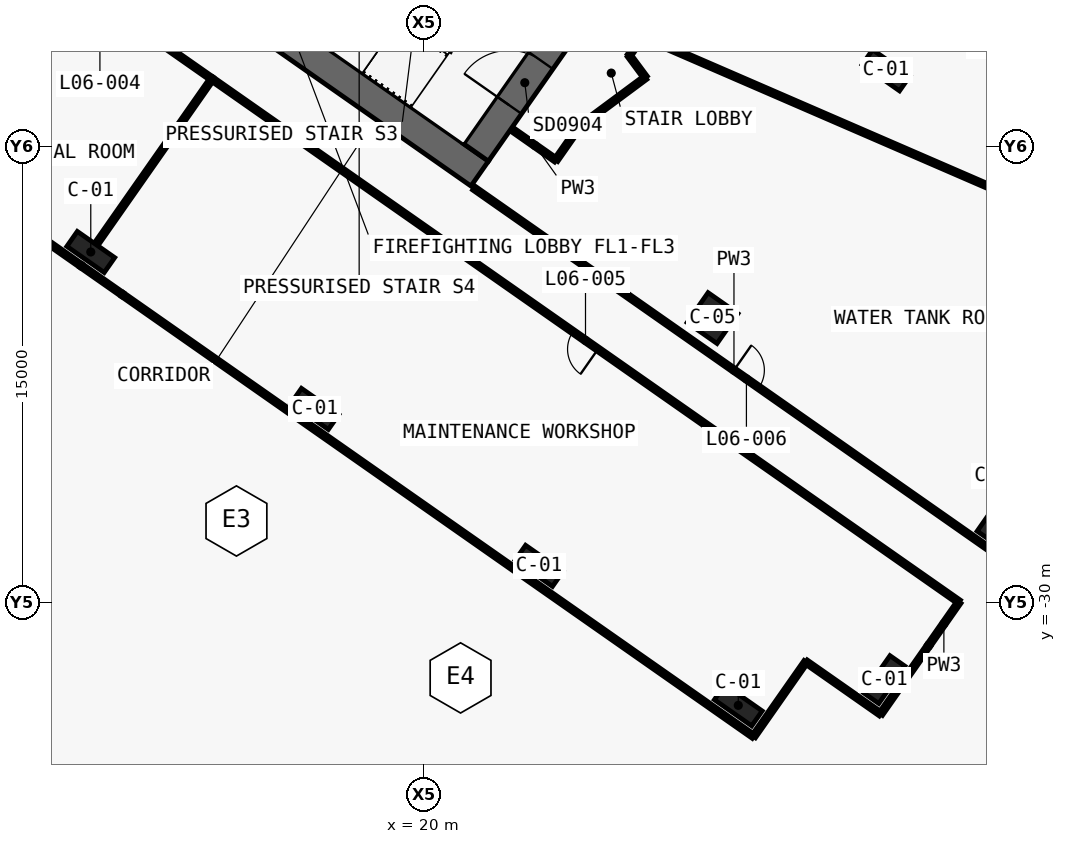
"""IFC4 building model, lengths in metres.
Left out: names, types, materials, properties, quantities, classifications, styles, units other than length and angle.
Written with IfcOpenShell. Run it as: python <this file> out.ifc"""

import sys

from ifc_helpers import new_model, si_unit, direction, frame, frame_2d, origin, origin_2d, place, context, subcontext, project, spatial, polyline, rectangle, outline, extrude, element, fill, save


model = new_model("IFC4")
c1 = context("Model", 3, precision=1e-05, world=origin(), true_north=direction((0.0, 1.0)))
c2 = subcontext(c1, "Body", "Model", "MODEL_VIEW")
j1 = project(units=[si_unit("LENGTHUNIT", "METRE"), si_unit("PLANEANGLEUNIT", "RADIAN")], contexts=[c1])
p1 = place(None, origin())
s1 = spatial("IfcSite", under=j1, at=p1, CompositionType="ELEMENT")
p2 = place(p1, origin())
s2 = spatial("IfcBuilding", under=s1, at=p2, CompositionType="ELEMENT")
p3 = place(p2, frame((0.0, 0.0, 43.0)))
s3 = spatial("IfcBuildingStorey", under=s2, at=p3, CompositionType="ELEMENT", Elevation=43.0)
p4 = place(p3, frame((-0.037, -0.585, 0.0), z_axis=(0.0, 0.0, 1.0), x_axis=(0.819157152511, -0.573569140985, 0.0)))
e1 = element("IfcWall", 1, at=p4, inside=s3, PredefinedType="SHEAR", context=c2, shape_type="SweptSolid", body=[
    extrude(outline(polyline([(26.695, 0.5), (0.0, 0.5), (0.7, -0.5), (26.695, -0.5), (26.695, 0.5)])), origin(), (0.0, 0.0, 1.0), 5.5),
])
p5 = place(p4, frame((1.245, 0.0, 0.0)))
e2 = element("IfcOpeningElement", 2, at=p5, cuts=e1, PredefinedType="OPENING", context=c2, shape_type="SweptSolid", body=[
    extrude(rectangle(XDim=1.5, YDim=2.1, at=frame_2d((0.75, 1.05))), frame((0.0, 0.51, 0.0), z_axis=(0.0, -1.0, 0.0), x_axis=(1.0, 0.0, 0.0)), (0.0, 0.0, 1.0), 1.02),
])
p6 = place(p4, frame((12.445, 0.0, 0.0)))
e3 = element("IfcOpeningElement", 3, at=p6, cuts=e1, PredefinedType="OPENING", context=c2, shape_type="SweptSolid", body=[
    extrude(rectangle(XDim=1.5, YDim=2.1, at=frame_2d((0.75, 1.05))), frame((0.0, 0.51, 0.0), z_axis=(0.0, -1.0, 0.0), x_axis=(1.0, 0.0, 0.0)), (0.0, 0.0, 1.0), 1.02),
])
p7 = place(p3, frame((21.708, -15.2, 0.0), z_axis=(0.0, 0.0, 1.0), x_axis=(0.573576324356, 0.819152122709, 0.0)))
e4 = element("IfcWall", 4, at=p7, inside=s3, PredefinedType="SHEAR", context=c2, shape_type="SweptSolid", body=[
    extrude(outline(polyline([(9.2, 0.5), (0.0, 0.5), (0.0, -0.5), (9.2, -0.5), (9.2, 0.5)])), origin(), (0.0, 0.0, 1.0), 5.5),
])
p8 = place(p7, frame((6.1, 0.0, 0.0)))
e5 = element("IfcOpeningElement", 5, at=p8, cuts=e4, PredefinedType="OPENING", context=c2, shape_type="SweptSolid", body=[
    extrude(rectangle(XDim=1.8, YDim=2.1, at=frame_2d((0.9, 1.05))), frame((0.0, 0.51, 0.0), z_axis=(0.0, -1.0, 0.0), x_axis=(1.0, 0.0, 0.0)), (0.0, 0.0, 1.0), 1.02),
])
p9 = place(p7, frame((1.9, 0.0, 0.0)))
e6 = element("IfcOpeningElement", 6, at=p9, cuts=e4, PredefinedType="OPENING", context=c2, shape_type="SweptSolid", body=[
    extrude(rectangle(XDim=1.8, YDim=2.1, at=frame_2d((0.9, 1.05))), frame((0.0, 0.51, 0.0), z_axis=(0.0, -1.0, 0.0), x_axis=(1.0, 0.0, 0.0)), (0.0, 0.0, 1.0), 1.02),
])
for number, where, z_axis, x_axis in (
    (7, (9.038, -18.475, 0.0), (0.0, 0.0, 1.0), (0.819, -0.574, 0.0)),
    (8, (16.41, -23.637, 0.0), (0.0, 0.0, 1.0), (0.819, -0.574, 0.0)),
    (9, (23.782, -28.799, 0.0), (0.0, 0.0, 1.0), (0.819, -0.574, 0.0)),
    (10, (30.336, -33.388, 0.0), (0.0, 0.0, 1.0), (0.819, -0.574, 0.0)),
    (11, (35.197, -12.498, 0.0), (0.0, 0.0, 1.0), (0.819, -0.574, 0.0)),
    (12, (35.14, -32.541, 0.0), (0.0, 0.0, 1.0), (0.574, 0.819, 0.0)),
    (13, (38.869, -27.216, 0.0), (0.0, 0.0, 1.0), (0.574, 0.819, 0.0)),
):
    element("IfcColumn", number, at=place(p3, frame(where, z_axis=z_axis, x_axis=x_axis)), inside=s3, PredefinedType="COLUMN", context=c2, shape_type="SweptSolid", body=[
        extrude(rectangle(XDim=1.5, YDim=0.6, at=origin_2d()), origin(), (0.0, 0.0, 1.0), 5.5),
    ])
p10 = place(p3, frame((29.49, -20.649, 0.0), z_axis=(0.0, 0.0, 1.0), x_axis=(0.819152044289, -0.573576436351, 0.0)))
e14 = element("IfcColumn", 14, at=p10, inside=s3, PredefinedType="COLUMN", context=c2, shape_type="SweptSolid", body=[
    extrude(rectangle(XDim=1.2, YDim=1.2, at=origin_2d()), origin(), (0.0, 0.0, 1.0), 5.5),
])
p11 = place(p3, frame((21.642, -16.375, 0.0), z_axis=(0.0, 0.0, 1.0), x_axis=(0.819148965066, -0.573580833911, 0.0)))
e15 = element("IfcWall", 15, at=p11, inside=s3, PredefinedType="PARTITIONING", context=c2, shape_type="SweptSolid", body=[
    extrude(rectangle(XDim=20.88, YDim=0.15, at=frame_2d((10.44, 0.0))), origin(), (0.0, 0.0, 1.0), 4.4),
])
p12 = place(p11, frame((10.44, 0.0, 0.0)))
e16 = element("IfcOpeningElement", 16, at=p12, cuts=e15, PredefinedType="OPENING", context=c2, shape_type="SweptSolid", body=[
    extrude(rectangle(XDim=1.0, YDim=2.1, at=frame_2d((0.5, 1.05))), frame((0.0, 0.085, 0.0), z_axis=(0.0, -1.0, 0.0), x_axis=(1.0, 0.0, 0.0)), (0.0, 0.0, 1.0), 0.17),
])
p13 = place(p3, frame((13.026, -12.783, 0.0), z_axis=(0.0, 0.0, 1.0), x_axis=(-0.81915291695, 0.57357519006, 0.0)))
e17 = element("IfcWall", 17, at=p13, inside=s3, PredefinedType="PARTITIONING", context=c2, shape_type="SweptSolid", body=[
    extrude(rectangle(XDim=9.002, YDim=0.15, at=frame_2d((4.501, 0.0))), origin(), (0.0, 0.0, 1.0), 4.5),
])
p14 = place(p13, frame((4.001, 0.0, 0.0)))
e18 = element("IfcOpeningElement", 18, at=p14, cuts=e17, PredefinedType="OPENING", context=c2, shape_type="SweptSolid", body=[
    extrude(rectangle(XDim=1.0, YDim=2.1, at=frame_2d((0.5, 1.05))), frame((0.0, 0.085, 0.0), z_axis=(0.0, -1.0, 0.0), x_axis=(1.0, 0.0, 0.0)), (0.0, 0.0, 1.0), 0.17),
])
p15 = place(p3, frame((37.599, -29.989, 0.0), z_axis=(0.0, 0.0, 1.0), x_axis=(-0.819154688631, 0.57357265982, 0.0)))
e19 = element("IfcWall", 19, at=p15, inside=s3, PredefinedType="PARTITIONING", context=c2, shape_type="SweptSolid", body=[
    extrude(rectangle(XDim=30.002, YDim=0.15, at=frame_2d((15.001, 0.0))), origin(), (0.0, 0.0, 1.0), 4.4),
])
p16 = place(p15, frame((14.501, 0.0, 0.0)))
e20 = element("IfcOpeningElement", 20, at=p16, cuts=e19, PredefinedType="OPENING", context=c2, shape_type="SweptSolid", body=[
    extrude(rectangle(XDim=1.0, YDim=2.1, at=frame_2d((0.5, 1.05))), frame((0.0, 0.085, 0.0), z_axis=(0.0, -1.0, 0.0), x_axis=(1.0, 0.0, 0.0)), (0.0, 0.0, 1.0), 0.17),
])
p17 = place(p3, frame((26.746, -12.014, 0.0), z_axis=(0.0, 0.0, 1.0), x_axis=(0.573761975376, 0.819022097146, 0.0)))
e21 = element("IfcWall", 21, at=p17, inside=s3, PredefinedType="PARTITIONING", context=c2, shape_type="SweptSolid", body=[
    extrude(rectangle(XDim=0.765, YDim=0.15, at=frame_2d((0.383, 0.0))), origin(), (0.0, 0.0, 1.0), 5.1),
])
p18 = place(p3, frame((27.185, -11.387, 0.0), z_axis=(0.0, 0.0, 1.0), x_axis=(0.917531384635, -0.397663372979, 0.0)))
e22 = element("IfcWall", 22, at=p18, inside=s3, PredefinedType="PARTITIONING", context=c2, shape_type="SweptSolid", body=[
    extrude(rectangle(XDim=16.536, YDim=0.15, at=frame_2d((8.268, 0.0))), origin(), (0.0, 0.0, 1.0), 4.4),
])
p19 = place(p3, frame((22.961, -14.49, 0.0), z_axis=(0.0, 0.0, 1.0), x_axis=(0.819109000826, -0.573637903879, 0.0)))
e23 = element("IfcWall", 23, at=p19, inside=s3, PredefinedType="PARTITIONING", context=c2, shape_type="SweptSolid", body=[
    extrude(rectangle(XDim=1.68, YDim=0.15, at=frame_2d((0.84, 0.0))), origin(), (0.0, 0.0, 1.0), 5.1),
])
p20 = place(p3, frame((24.337, -15.454, 0.0), z_axis=(0.0, 0.0, 1.0), x_axis=(0.573571252353, 0.819155674139, 0.0)))
e24 = element("IfcWall", 24, at=p20, inside=s3, PredefinedType="PARTITIONING", context=c2, shape_type="SweptSolid", body=[
    extrude(rectangle(XDim=1.354, YDim=0.15, at=frame_2d((0.677, 0.0))), origin(), (0.0, 0.0, 1.0), 5.1),
])
p21 = place(p3, frame((25.114, -14.345, 0.0), z_axis=(0.0, 0.0, 1.0), x_axis=(0.803211070557, 0.595694532571, 0.0)))
e25 = element("IfcWall", 25, at=p21, inside=s3, PredefinedType="PARTITIONING", context=c2, shape_type="SweptSolid", body=[
    extrude(rectangle(XDim=2.7, YDim=0.15, at=frame_2d((1.35, 0.0))), origin(), (0.0, 0.0, 1.0), 5.1),
])
p22 = place(p3, frame((27.282, -12.737, 0.0), z_axis=(0.0, 0.0, 1.0), x_axis=(-0.595869495235, 0.803081281471, 0.0)))
e26 = element("IfcWall", 26, at=p22, inside=s3, PredefinedType="PARTITIONING", context=c2, shape_type="SweptSolid", body=[
    extrude(rectangle(XDim=0.9, YDim=0.15, at=frame_2d((0.45, 0.0))), origin(), (0.0, 0.0, 1.0), 5.1),
])
p23 = place(p3, frame((13.024, -12.782, 0.0), z_axis=(0.0, 0.0, 1.0), x_axis=(-0.573556251799, -0.819166177294, 0.0)))
e27 = element("IfcWall", 27, at=p23, inside=s3, PredefinedType="PARTITIONING", context=c2, shape_type="SweptSolid", body=[
    extrude(rectangle(XDim=6.63, YDim=0.15, at=frame_2d((3.315, 0.0))), origin(), (0.0, 0.0, 1.0), 4.5),
])
p24 = place(p3, frame((8.722, -18.926, 0.0), z_axis=(0.0, 0.0, 1.0), x_axis=(-0.819141427692, 0.573591598124, 0.0)))
e28 = element("IfcWall", 28, at=p24, inside=s3, PredefinedType="PARTITIONING", context=c2, shape_type="SweptSolid", body=[
    extrude(rectangle(XDim=9.0, YDim=0.15, at=frame_2d((4.5, 0.0))), origin(), (0.0, 0.0, 1.0), 5.1),
])
p25 = place(p3, frame((32.56, -31.955, 0.0), z_axis=(0.0, 0.0, 1.0), x_axis=(-0.573560650686, -0.819163097304, 0.0)))
e29 = element("IfcWall", 29, at=p25, inside=s3, PredefinedType="PARTITIONING", context=c2, shape_type="SweptSolid", body=[
    extrude(rectangle(XDim=3.0, YDim=0.15, at=frame_2d((1.5, 0.0))), origin(), (0.0, 0.0, 1.0), 4.4),
])
p26 = place(p3, frame((30.839, -34.412, 0.0), z_axis=(0.0, 0.0, 1.0), x_axis=(-0.819153188106, 0.573574802808, 0.0)))
e30 = element("IfcWall", 30, at=p26, inside=s3, PredefinedType="PARTITIONING", context=c2, shape_type="SweptSolid", body=[
    extrude(rectangle(XDim=25.351, YDim=0.15, at=frame_2d((12.675, 0.0))), origin(), (0.0, 0.0, 1.0), 4.08),
])
p27 = place(p3, frame((36.599, -31.417, 0.0), z_axis=(0.0, 0.0, 1.0), x_axis=(-0.573557416232, -0.819165361991, 0.0)))
e31 = element("IfcWall", 31, at=p27, inside=s3, PredefinedType="PARTITIONING", context=c2, shape_type="SweptSolid", body=[
    extrude(rectangle(XDim=2.757, YDim=0.15, at=frame_2d((1.379, 0.0))), origin(), (0.0, 0.0, 1.0), 5.1),
])
p28 = place(p3, frame((35.018, -33.675, 0.0), z_axis=(0.0, 0.0, 1.0), x_axis=(-0.819163097304, 0.573560650686, 0.0)))
e32 = element("IfcWall", 32, at=p28, inside=s3, PredefinedType="PARTITIONING", context=c2, shape_type="SweptSolid", body=[
    extrude(rectangle(XDim=3.0, YDim=0.15, at=frame_2d((1.5, 0.0))), origin(), (0.0, 0.0, 1.0), 4.4),
])
p29 = place(p3, frame((37.599, -29.989, 0.0), z_axis=(0.0, 0.0, 1.0), x_axis=(-0.573575034625, -0.819153025786, 0.0)))
e33 = element("IfcWall", 33, at=p29, inside=s3, PredefinedType="PARTITIONING", context=c2, shape_type="SweptSolid", body=[
    extrude(rectangle(XDim=1.745, YDim=0.15, at=frame_2d((0.872, 0.0))), origin(), (0.0, 0.0, 1.0), 5.1),
])
p30 = place(p3, frame((10.075, -19.873, 0.0), z_axis=(0.0, 0.0, 1.0), x_axis=(-0.819190252408, 0.573521865634, 0.0)))
e34 = element("IfcWall", 34, at=p30, inside=s3, PredefinedType="PARTITIONING", context=c2, shape_type="SweptSolid", body=[
    extrude(rectangle(XDim=1.652, YDim=0.15, at=frame_2d((0.826, 0.0))), origin(), (0.0, 0.0, 1.0), 4.08),
])
p31 = place(p9, origin())
e35 = element("IfcDoor", 35, at=p31, inside=s3, OperationType="DOUBLE_DOOR_SINGLE_SWING", PredefinedType="DOOR", context=c2, shape_type="SweptSolid", body=[
    extrude(rectangle(XDim=1.8, YDim=2.1, at=frame_2d((0.9, 1.05))), frame((0.0, 0.025, 0.0), z_axis=(0.0, -1.0, 0.0), x_axis=(1.0, 0.0, 0.0)), (0.0, 0.0, 1.0), 0.05),
])
fill(e6, e35)
p32 = place(p16, origin())
e36 = element("IfcDoor", 36, at=p32, inside=s3, OperationType="SINGLE_SWING_LEFT", PredefinedType="DOOR", context=c2, shape_type="SweptSolid", body=[
    extrude(rectangle(XDim=1.0, YDim=2.1, at=frame_2d((0.5, 1.05))), frame((0.0, 0.025, 0.0), z_axis=(0.0, -1.0, 0.0), x_axis=(1.0, 0.0, 0.0)), (0.0, 0.0, 1.0), 0.05),
])
fill(e20, e36)
p33 = place(p12, origin())
e37 = element("IfcDoor", 37, at=p33, inside=s3, OperationType="SINGLE_SWING_LEFT", PredefinedType="DOOR", context=c2, shape_type="SweptSolid", body=[
    extrude(rectangle(XDim=1.0, YDim=2.1, at=frame_2d((0.5, 1.05))), frame((0.0, 0.025, 0.0), z_axis=(0.0, -1.0, 0.0), x_axis=(1.0, 0.0, 0.0)), (0.0, 0.0, 1.0), 0.05),
])
fill(e16, e37)
save(model, sys.argv[1])
